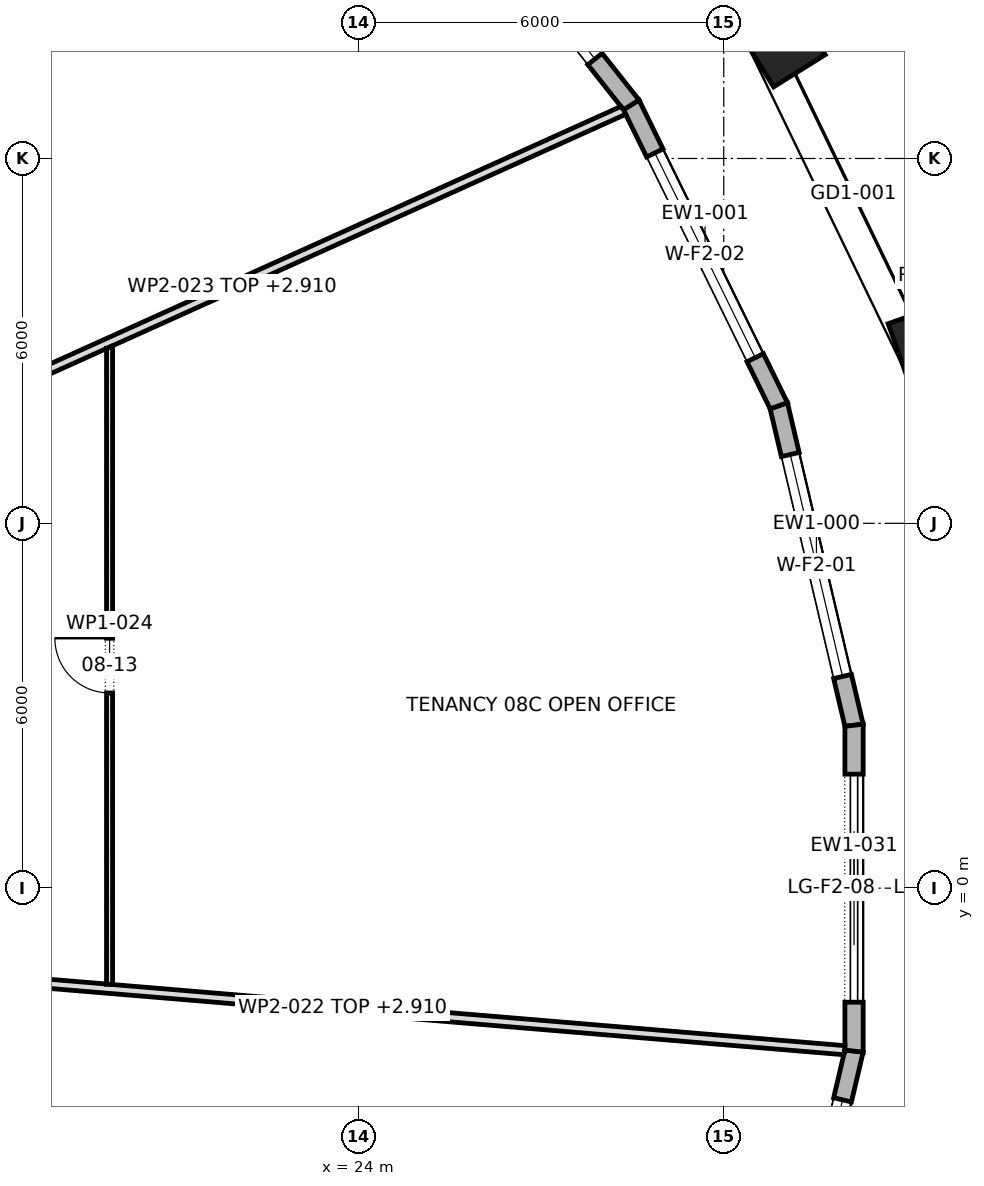
"""IFC4 building model, lengths in metres.
Left out: names, types, materials, properties, quantities, classifications, styles, units other than length and angle.
Written with IfcOpenShell. Run it as: python <this file> out.ifc"""

import sys

from ifc_helpers import new_model, si_unit, direction, frame, frame_2d, origin, origin_2d, place, context, subcontext, project, spatial, polyline, rectangle, outline, extrude, element, fill, save


model = new_model("IFC4")
c1 = context("Model", 3, precision=1e-05, world=origin(), true_north=direction((0.0, 1.0)))
c2 = subcontext(c1, "Body", "Model", "MODEL_VIEW")
j1 = project(units=[si_unit("LENGTHUNIT", "METRE"), si_unit("PLANEANGLEUNIT", "RADIAN")], contexts=[c1])
p1 = place(None, origin())
s1 = spatial("IfcSite", under=j1, at=p1, CompositionType="ELEMENT")
p2 = place(p1, origin())
s2 = spatial("IfcBuilding", under=s1, at=p2, CompositionType="ELEMENT")
p3 = place(p2, frame((0.0, 0.0, 117.1)))
s3 = spatial("IfcBuildingStorey", under=s2, at=p3, CompositionType="ELEMENT", Elevation=117.1)
for number, where, z_axis, x_axis in (
    (1, (33.443, 8.695, 0.0), (0.0, 0.0, 1.0), (-0.334, 0.943, 0.0)),
    (2, (30.821, 14.121, 0.0), (0.0, 0.0, 1.0), (-0.529, 0.849, 0.0)),
):
    element("IfcColumn", number, at=place(p3, frame(where, z_axis=z_axis, x_axis=x_axis)), inside=s3, PredefinedType="COLUMN", context=c2, shape_type="SweptSolid", body=[
        extrude(rectangle(XDim=1.6, YDim=1.0, at=origin_2d()), origin(), (0.0, 0.0, 1.0), 4.2),
    ])
p4 = place(p3, frame((32.143, 2.679, 0.0), z_axis=(0.0, 0.0, 1.0), x_axis=(-0.229200658045, 0.973379195561, 0.0)))
e3 = element("IfcWall", 3, at=p4, inside=s3, PredefinedType="STANDARD", context=c2, shape_type="SweptSolid", body=[
    extrude(outline(polyline([(-0.017, -0.15), (5.415, -0.15), (5.382, 0.15), (0.017, 0.15), (-0.017, -0.15)])), origin(), (0.0, 0.0, 1.0), 3.9),
])
p5 = place(p4, frame((0.824, 0.0, 0.6)))
e4 = element("IfcOpeningElement", 4, at=p5, cuts=e3, PredefinedType="OPENING", context=c2, shape_type="SweptSolid", body=[
    extrude(rectangle(XDim=3.75, YDim=2.85, at=frame_2d((1.875, 1.425))), frame((0.0, 0.162, 0.0), z_axis=(0.0, -1.0, 0.0), x_axis=(1.0, 0.0, 0.0)), (0.0, 0.0, 1.0), 0.324),
])
p6 = place(p3, frame((30.905, 7.934, 0.0), z_axis=(0.0, 0.0, 1.0), x_axis=(-0.440306401535, 0.897847577692, 0.0)))
e5 = element("IfcWall", 5, at=p6, inside=s3, PredefinedType="STANDARD", context=c2, shape_type="SweptSolid", body=[
    extrude(outline(polyline([(-0.017, -0.15), (5.527, -0.15), (5.494, 0.15), (0.017, 0.15), (-0.017, -0.15)])), origin(), (0.0, 0.0, 1.0), 3.9),
])
p7 = place(p6, frame((0.88, 0.0, 0.6)))
e6 = element("IfcOpeningElement", 6, at=p7, cuts=e5, PredefinedType="OPENING", context=c2, shape_type="SweptSolid", body=[
    extrude(rectangle(XDim=3.75, YDim=2.85, at=frame_2d((1.875, 1.425))), frame((0.0, 0.162, 0.0), z_axis=(0.0, -1.0, 0.0), x_axis=(1.0, 0.0, 0.0)), (0.0, 0.0, 1.0), 0.324),
])
p8 = place(p3, frame((28.479, 12.881, 0.0), z_axis=(0.0, 0.0, 1.0), x_axis=(-0.62038332391, 0.784298751379, 0.0)))
e7 = element("IfcWall", 7, at=p8, inside=s3, PredefinedType="STANDARD", context=c2, shape_type="SweptSolid", body=[
    extrude(outline(polyline([(-0.016, -0.15), (5.69, -0.15), (5.66, 0.15), (0.016, 0.15), (-0.016, -0.15)])), origin(), (0.0, 0.0, 1.0), 3.9),
])
p9 = place(p8, frame((0.962, 0.0, 0.6)))
e8 = element("IfcOpeningElement", 8, at=p9, cuts=e7, PredefinedType="OPENING", context=c2, shape_type="SweptSolid", body=[
    extrude(rectangle(XDim=3.75, YDim=2.85, at=frame_2d((1.875, 1.425))), frame((0.0, 0.162, 0.0), z_axis=(0.0, -1.0, 0.0), x_axis=(1.0, 0.0, 0.0)), (0.0, 0.0, 1.0), 0.324),
])
p10 = place(p3, frame((30.905, -7.934, 0.0), z_axis=(0.0, 0.0, 1.0), x_axis=(0.229200658045, 0.973379195561, 0.0)))
e9 = element("IfcWall", 9, at=p10, inside=s3, PredefinedType="STANDARD", context=c2, shape_type="SweptSolid", body=[
    extrude(outline(polyline([(-0.017, -0.15), (5.416, -0.15), (5.381, 0.15), (0.017, 0.15), (-0.017, -0.15)])), origin(), (0.0, 0.0, 1.0), 3.9),
])
p11 = place(p10, frame((0.824, 0.0, 0.6)))
e10 = element("IfcOpeningElement", 10, at=p11, cuts=e9, PredefinedType="OPENING", context=c2, shape_type="SweptSolid", body=[
    extrude(rectangle(XDim=3.75, YDim=2.85, at=frame_2d((1.875, 1.425))), frame((0.0, 0.162, 0.0), z_axis=(0.0, -1.0, 0.0), x_axis=(1.0, 0.0, 0.0)), (0.0, 0.0, 1.0), 0.324),
])
p12 = place(p3, frame((32.143, -2.679, 0.0), z_axis=(0.0, 0.0, 1.0), x_axis=(0.0, 1.0, 0.0)))
e11 = element("IfcWall", 11, at=p12, inside=s3, PredefinedType="STANDARD", context=c2, shape_type="SweptSolid", body=[
    extrude(outline(polyline([(-0.017, -0.15), (5.375, -0.15), (5.341, 0.15), (0.017, 0.15), (-0.017, -0.15)])), origin(), (0.0, 0.0, 1.0), 3.9),
])
p13 = place(p12, frame((0.804, 0.0, 0.0)))
e12 = element("IfcOpeningElement", 12, at=p13, cuts=e11, PredefinedType="OPENING", context=c2, shape_type="SweptSolid", body=[
    extrude(rectangle(XDim=3.75, YDim=3.45, at=frame_2d((1.875, 1.725))), frame((0.0, 0.162, 0.0), z_axis=(0.0, -1.0, 0.0), x_axis=(1.0, 0.0, 0.0)), (0.0, 0.0, 1.0), 0.324),
])
p14 = place(p3, frame((15.469, -1.286, 0.0), z_axis=(0.0, 0.0, 1.0), x_axis=(0.996533353756, -0.083194199634, 0.0)))
e13 = element("IfcWall", 13, at=p14, inside=s3, PredefinedType="PARTITIONING", context=c2, shape_type="SweptSolid", body=[
    extrude(outline(polyline([(0.012, -0.075), (1.852, -0.075), (3.691, -0.075), (5.531, -0.075), (7.371, -0.075), (9.21, -0.075), (11.05, -0.075), (12.89, -0.075), (14.729, -0.075), (16.569, -0.075), (16.574, -0.037), (16.574, 0.075), (14.836, 0.075), (13.097, 0.075), (11.358, 0.075), (9.619, 0.075), (7.881, 0.075), (6.142, 0.075), (4.403, 0.075), (4.39, 0.074), (4.39, 0.075), (2.927, 0.075), (1.463, 0.075), (0.0, 0.075), (0.0, 0.069), (0.012, -0.075)])), origin(), (0.0, 0.0, 1.0), 2.91),
])
p15 = place(p3, frame((15.444, 6.97, 0.0), z_axis=(0.0, 0.0, 1.0), x_axis=(0.911543819319, 0.411202949237, 0.0)))
e14 = element("IfcWall", 14, at=p15, inside=s3, PredefinedType="PARTITIONING", context=c2, shape_type="SweptSolid", body=[
    extrude(outline(polyline([(0.0, -0.075), (1.6, -0.075), (3.2, -0.075), (4.8, -0.075), (4.801, -0.073), (4.805, -0.075), (6.677, -0.075), (8.549, -0.075), (10.421, -0.075), (12.293, -0.075), (14.166, -0.075), (14.166, -0.063), (14.163, 0.007), (14.146, 0.075), (12.386, 0.075), (10.627, 0.075), (8.867, 0.075), (7.107, 0.075), (5.347, 0.075), (3.587, 0.075), (1.828, 0.075), (0.068, 0.075), (0.0, -0.075)])), origin(), (0.0, 0.0, 1.0), 2.91),
])
p16 = place(p3, frame((19.9, 8.92, 0.0), z_axis=(0.0, 0.0, 1.0), x_axis=(0.0, -1.0, 0.0)))
e15 = element("IfcWall", 15, at=p16, inside=s3, PredefinedType="PARTITIONING", context=c2, shape_type="SweptSolid", body=[
    extrude(outline(polyline([(0.045, -0.05), (1.787, -0.05), (3.529, -0.05), (5.271, -0.05), (7.012, -0.05), (8.754, -0.05), (10.496, -0.05), (10.504, 0.048), (10.504, 0.05), (8.754, 0.05), (7.003, 0.05), (5.252, 0.05), (3.501, 0.05), (1.751, 0.05), (0.0, 0.05), (0.0, 0.049), (0.045, -0.05)])), origin(), (0.0, 0.0, 1.0), 3.9),
])
p17 = place(p16, frame((4.81, 0.0, 0.0)))
e16 = element("IfcOpeningElement", 16, at=p17, cuts=e15, PredefinedType="OPENING", context=c2, shape_type="SweptSolid", body=[
    extrude(rectangle(XDim=0.9, YDim=2.1, at=frame_2d((0.45, 1.05))), frame((0.0, 0.062, 0.0), z_axis=(0.0, -1.0, 0.0), x_axis=(1.0, 0.0, 0.0)), (0.0, 0.0, 1.0), 0.124),
])
p18 = place(p5, origin())
e17 = element("IfcWindow", 17, at=p18, inside=s3, PartitioningType="TRIPLE_PANEL_VERTICAL", PredefinedType="WINDOW", context=c2, shape_type="SweptSolid", body=[
    extrude(rectangle(XDim=3.75, YDim=2.85, at=frame_2d((1.875, 1.425))), frame((0.0, 0.03, 0.0), z_axis=(0.0, -1.0, 0.0), x_axis=(1.0, 0.0, 0.0)), (0.0, 0.0, 1.0), 0.06),
])
fill(e4, e17)
p19 = place(p7, origin())
e18 = element("IfcWindow", 18, at=p19, inside=s3, PartitioningType="TRIPLE_PANEL_VERTICAL", PredefinedType="WINDOW", context=c2, shape_type="SweptSolid", body=[
    extrude(rectangle(XDim=3.75, YDim=2.85, at=frame_2d((1.875, 1.425))), frame((0.0, 0.03, 0.0), z_axis=(0.0, -1.0, 0.0), x_axis=(1.0, 0.0, 0.0)), (0.0, 0.0, 1.0), 0.06),
])
fill(e6, e18)
p20 = place(p9, origin())
e19 = element("IfcWindow", 19, at=p20, inside=s3, PartitioningType="TRIPLE_PANEL_VERTICAL", PredefinedType="WINDOW", context=c2, shape_type="SweptSolid", body=[
    extrude(rectangle(XDim=3.75, YDim=2.85, at=frame_2d((1.875, 1.425))), frame((0.0, 0.03, 0.0), z_axis=(0.0, -1.0, 0.0), x_axis=(1.0, 0.0, 0.0)), (0.0, 0.0, 1.0), 0.06),
])
fill(e8, e19)
p21 = place(p11, origin())
e20 = element("IfcWindow", 20, at=p21, inside=s3, PartitioningType="TRIPLE_PANEL_VERTICAL", PredefinedType="WINDOW", context=c2, shape_type="SweptSolid", body=[
    extrude(rectangle(XDim=3.75, YDim=2.85, at=frame_2d((1.875, 1.425))), frame((0.0, 0.03, 0.0), z_axis=(0.0, -1.0, 0.0), x_axis=(1.0, 0.0, 0.0)), (0.0, 0.0, 1.0), 0.06),
])
fill(e10, e20)
p22 = place(p13, origin())
e21 = element("IfcDoor", 21, at=p22, inside=s3, OperationType="DOUBLE_DOOR_SLIDING", PredefinedType="DOOR", context=c2, shape_type="SweptSolid", body=[
    extrude(rectangle(XDim=3.75, YDim=3.45, at=frame_2d((1.875, 1.725))), frame((0.0, 0.025, 0.0), z_axis=(0.0, -1.0, 0.0), x_axis=(1.0, 0.0, 0.0)), (0.0, 0.0, 1.0), 0.05),
])
fill(e12, e21)
p23 = place(p17, frame((0.9, 0.0, 0.0), z_axis=(0.0, 0.0, 1.0), x_axis=(-1.0, 0.0, 0.0)))
e22 = element("IfcDoor", 22, at=p23, inside=s3, OperationType="SINGLE_SWING_LEFT", PredefinedType="DOOR", context=c2, shape_type="SweptSolid", body=[
    extrude(rectangle(XDim=0.9, YDim=2.1, at=frame_2d((0.45, 1.05))), frame((0.0, 0.025, 0.0), z_axis=(0.0, -1.0, 0.0), x_axis=(1.0, 0.0, 0.0)), (0.0, 0.0, 1.0), 0.05),
])
fill(e16, e22)
save(model, sys.argv[1])
